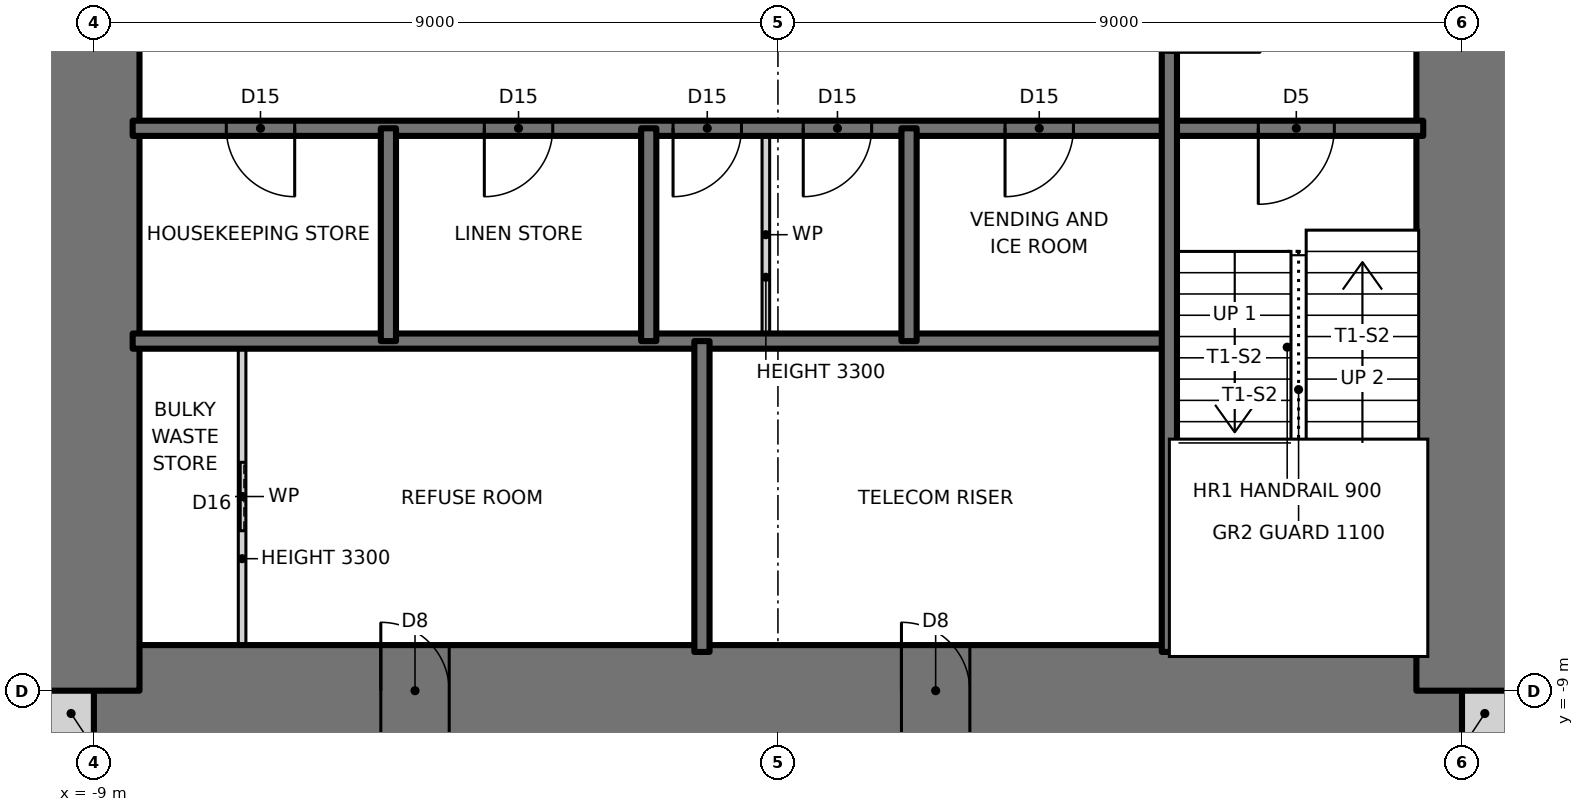
"""IFC4 building model, lengths in metres.
Left out: names, types, materials, properties, quantities, classifications, styles, units other than length and angle.
Written with IfcOpenShell. Run it as: python <this file> out.ifc"""

import sys

from ifc_helpers import new_model, si_unit, direction, frame, frame_2d, origin, place, context, subcontext, project, spatial, rectangle, extrude, element, fill, save


model = new_model("IFC4")
c1 = context("Model", 3, precision=1e-05, world=origin(), true_north=direction((0.0, 1.0)))
c2 = subcontext(c1, "Body", "Model", "MODEL_VIEW")
j1 = project(units=[si_unit("LENGTHUNIT", "METRE"), si_unit("PLANEANGLEUNIT", "RADIAN")], contexts=[c1])
p1 = place(None, origin())
s1 = spatial("IfcSite", under=j1, at=p1, CompositionType="ELEMENT")
p2 = place(p1, origin())
s2 = spatial("IfcBuilding", under=s1, at=p2, CompositionType="ELEMENT")
p3 = place(p2, frame((0.0, 0.0, 174.0)))
s3 = spatial("IfcBuildingStorey", under=s2, at=p3, CompositionType="ELEMENT", Elevation=174.0)
for number, where, z_axis, x_axis in (
    (1, (-9.6, -9.3, 0.0), (0.0, 0.0, 1.0), (1.0, 0.0, 0.0)),
    (2, (9.0, -9.3, 0.0), (0.0, 0.0, 1.0), (1.0, 0.0, 0.0)),
):
    element("IfcWall", number, at=place(p3, frame(where, z_axis=z_axis, x_axis=x_axis)), inside=s3, PredefinedType="SOLIDWALL", context=c2, shape_type="SweptSolid", body=[
        extrude(rectangle(XDim=0.6, YDim=0.6, at=frame_2d((0.3, 0.0))), origin(), (0.0, 0.0, 1.0), 3.5),
    ])
p4 = place(p3, frame((-9.0, -9.0, 0.0), z_axis=(0.0, 0.0, 1.0), x_axis=(1.0, 0.0, 0.0)))
e3 = element("IfcWall", 3, at=p4, inside=s3, PredefinedType="SHEAR", context=c2, shape_type="SweptSolid", body=[
    extrude(rectangle(XDim=18.0, YDim=1.2, at=frame_2d((9.0, 0.0))), origin(), (0.0, 0.0, 1.0), 3.5),
])
p5 = place(p4, frame((3.775, 0.0, 0.0)))
e4 = element("IfcOpeningElement", 4, at=p5, cuts=e3, PredefinedType="OPENING", context=c2, shape_type="SweptSolid", body=[
    extrude(rectangle(XDim=0.9, YDim=2.1, at=frame_2d((0.45, 1.05))), frame((0.0, 0.61, 0.0), z_axis=(0.0, -1.0, 0.0), x_axis=(1.0, 0.0, 0.0)), (0.0, 0.0, 1.0), 1.22),
])
p6 = place(p4, frame((10.625, 0.0, 0.0)))
e5 = element("IfcOpeningElement", 5, at=p6, cuts=e3, PredefinedType="OPENING", context=c2, shape_type="SweptSolid", body=[
    extrude(rectangle(XDim=0.9, YDim=2.1, at=frame_2d((0.45, 1.05))), frame((0.0, 0.61, 0.0), z_axis=(0.0, -1.0, 0.0), x_axis=(1.0, 0.0, 0.0)), (0.0, 0.0, 1.0), 1.22),
])
p7 = place(p3, frame((9.0, -9.0, 0.0), z_axis=(0.0, 0.0, 1.0), x_axis=(0.0, 1.0, 0.0)))
e6 = element("IfcWall", 6, at=p7, inside=s3, PredefinedType="SHEAR", context=c2, shape_type="SweptSolid", body=[
    extrude(rectangle(XDim=18.0, YDim=1.2, at=frame_2d((9.0, 0.0))), origin(), (0.0, 0.0, 1.0), 3.5),
])
p8 = place(p7, frame((8.5, 0.0, 0.0)))
e7 = element("IfcOpeningElement", 7, at=p8, cuts=e6, PredefinedType="OPENING", context=c2, shape_type="SweptSolid", body=[
    extrude(rectangle(XDim=1.0, YDim=2.1, at=frame_2d((0.5, 1.05))), frame((0.0, 0.61, 0.0), z_axis=(0.0, -1.0, 0.0), x_axis=(1.0, 0.0, 0.0)), (0.0, 0.0, 1.0), 1.22),
])
p9 = place(p3, frame((-9.0, 9.0, 0.0), z_axis=(0.0, 0.0, 1.0), x_axis=(0.0, -1.0, 0.0)))
e8 = element("IfcWall", 8, at=p9, inside=s3, PredefinedType="SHEAR", context=c2, shape_type="SweptSolid", body=[
    extrude(rectangle(XDim=18.0, YDim=1.2, at=frame_2d((9.0, 0.0))), origin(), (0.0, 0.0, 1.0), 3.5),
])
p10 = place(p9, frame((8.5, 0.0, 0.0)))
e9 = element("IfcOpeningElement", 9, at=p10, cuts=e8, PredefinedType="OPENING", context=c2, shape_type="SweptSolid", body=[
    extrude(rectangle(XDim=1.0, YDim=2.1, at=frame_2d((0.5, 1.05))), frame((0.0, 0.61, 0.0), z_axis=(0.0, -1.0, 0.0), x_axis=(1.0, 0.0, 0.0)), (0.0, 0.0, 1.0), 1.22),
])
p11 = place(p3, frame((-8.49, -4.4, 0.0), z_axis=(0.0, 0.0, 1.0), x_axis=(1.0, 0.0, 0.0)))
e10 = element("IfcWall", 10, at=p11, inside=s3, PredefinedType="SOLIDWALL", context=c2, shape_type="SweptSolid", body=[
    extrude(rectangle(XDim=13.64, YDim=0.2, at=frame_2d((6.82, 0.0))), origin(), (0.0, 0.0, 1.0), 3.5),
])
p12 = place(p3, frame((-8.49, -1.6, 0.0), z_axis=(0.0, 0.0, 1.0), x_axis=(1.0, 0.0, 0.0)))
e11 = element("IfcWall", 11, at=p12, inside=s3, PredefinedType="SOLIDWALL", context=c2, shape_type="SweptSolid", body=[
    extrude(rectangle(XDim=16.98, YDim=0.2, at=frame_2d((8.49, 0.0))), origin(), (0.0, 0.0, 1.0), 3.5),
])
p13 = place(p12, frame((14.81, 0.0, 0.0)))
e12 = element("IfcOpeningElement", 12, at=p13, cuts=e11, PredefinedType="OPENING", context=c2, shape_type="SweptSolid", body=[
    extrude(rectangle(XDim=1.0, YDim=2.1, at=frame_2d((0.5, 1.05))), frame((0.0, 0.11, 0.0), z_axis=(0.0, -1.0, 0.0), x_axis=(1.0, 0.0, 0.0)), (0.0, 0.0, 1.0), 0.22),
])
p14 = place(p12, frame((1.232, 0.0, 0.0)))
e13 = element("IfcOpeningElement", 13, at=p14, cuts=e11, PredefinedType="OPENING", context=c2, shape_type="SweptSolid", body=[
    extrude(rectangle(XDim=0.9, YDim=2.1, at=frame_2d((0.45, 1.05))), frame((0.0, 0.11, 0.0), z_axis=(0.0, -1.0, 0.0), x_axis=(1.0, 0.0, 0.0)), (0.0, 0.0, 1.0), 0.22),
])
p15 = place(p12, frame((4.627, 0.0, 0.0)))
e14 = element("IfcOpeningElement", 14, at=p15, cuts=e11, PredefinedType="OPENING", context=c2, shape_type="SweptSolid", body=[
    extrude(rectangle(XDim=0.9, YDim=2.1, at=frame_2d((0.45, 1.05))), frame((0.0, 0.11, 0.0), z_axis=(0.0, -1.0, 0.0), x_axis=(1.0, 0.0, 0.0)), (0.0, 0.0, 1.0), 0.22),
])
p16 = place(p12, frame((8.823, 0.0, 0.0)))
e15 = element("IfcOpeningElement", 15, at=p16, cuts=e11, PredefinedType="OPENING", context=c2, shape_type="SweptSolid", body=[
    extrude(rectangle(XDim=0.9, YDim=2.1, at=frame_2d((0.45, 1.05))), frame((0.0, 0.11, 0.0), z_axis=(0.0, -1.0, 0.0), x_axis=(1.0, 0.0, 0.0)), (0.0, 0.0, 1.0), 0.22),
])
p17 = place(p12, frame((7.11, 0.0, 0.0)))
e16 = element("IfcOpeningElement", 16, at=p17, cuts=e11, PredefinedType="OPENING", context=c2, shape_type="SweptSolid", body=[
    extrude(rectangle(XDim=0.9, YDim=2.1, at=frame_2d((0.45, 1.05))), frame((0.0, 0.11, 0.0), z_axis=(0.0, -1.0, 0.0), x_axis=(1.0, 0.0, 0.0)), (0.0, 0.0, 1.0), 0.22),
])
p18 = place(p12, frame((11.478, 0.0, 0.0)))
e17 = element("IfcOpeningElement", 17, at=p18, cuts=e11, PredefinedType="OPENING", context=c2, shape_type="SweptSolid", body=[
    extrude(rectangle(XDim=0.9, YDim=2.1, at=frame_2d((0.45, 1.05))), frame((0.0, 0.11, 0.0), z_axis=(0.0, -1.0, 0.0), x_axis=(1.0, 0.0, 0.0)), (0.0, 0.0, 1.0), 0.22),
])
p19 = place(p3, frame((5.15, -8.49, 0.0), z_axis=(0.0, 0.0, 1.0), x_axis=(0.0, 1.0, 0.0)))
e18 = element("IfcWall", 18, at=p19, inside=s3, PredefinedType="SOLIDWALL", context=c2, shape_type="SweptSolid", body=[
    extrude(rectangle(XDim=13.09, YDim=0.2, at=frame_2d((6.545, 0.0))), origin(), (0.0, 0.0, 1.0), 3.5),
])
p20 = place(p19, frame((7.89, 0.0, 0.0)))
e19 = element("IfcOpeningElement", 19, at=p20, cuts=e18, PredefinedType="OPENING", context=c2, shape_type="SweptSolid", body=[
    extrude(rectangle(XDim=1.2, YDim=2.1, at=frame_2d((0.6, 1.05))), frame((0.0, 0.11, 0.0), z_axis=(0.0, -1.0, 0.0), x_axis=(1.0, 0.0, 0.0)), (0.0, 0.0, 1.0), 0.22),
])
p21 = place(p3, frame((1.725, -4.4, 0.0), z_axis=(0.0, 0.0, 1.0), x_axis=(0.0, 1.0, 0.0)))
e20 = element("IfcWall", 20, at=p21, inside=s3, PredefinedType="SOLIDWALL", context=c2, shape_type="SweptSolid", body=[
    extrude(rectangle(XDim=2.8, YDim=0.2, at=frame_2d((1.4, 0.0))), origin(), (0.0, 0.0, 1.0), 3.5),
])
p22 = place(p3, frame((-0.159, -4.4, 0.0), z_axis=(0.0, 0.0, 1.0), x_axis=(0.0, 1.0, 0.0)))
e21 = element("IfcWall", 21, at=p22, inside=s3, PredefinedType="PARTITIONING", context=c2, shape_type="SweptSolid", body=[
    extrude(rectangle(XDim=2.8, YDim=0.1, at=frame_2d((1.4, 0.0))), origin(), (0.0, 0.0, 1.0), 3.3),
])
p23 = place(p3, frame((-1.0, -8.49, 0.0), z_axis=(0.0, 0.0, 1.0), x_axis=(0.0, 1.0, 0.0)))
e22 = element("IfcWall", 22, at=p23, inside=s3, PredefinedType="SOLIDWALL", context=c2, shape_type="SweptSolid", body=[
    extrude(rectangle(XDim=4.09, YDim=0.2, at=frame_2d((2.045, 0.0))), origin(), (0.0, 0.0, 1.0), 3.5),
])
for number, where, z_axis, x_axis in (
    (23, (-1.7, -4.4, 0.0), (0.0, 0.0, 1.0), (0.0, 1.0, 0.0)),
    (24, (-5.125, -4.4, 0.0), (0.0, 0.0, 1.0), (0.0, 1.0, 0.0)),
):
    element("IfcWall", number, at=place(p3, frame(where, z_axis=z_axis, x_axis=x_axis)), inside=s3, PredefinedType="SOLIDWALL", context=c2, shape_type="SweptSolid", body=[
        extrude(rectangle(XDim=2.8, YDim=0.2, at=frame_2d((1.4, 0.0))), origin(), (0.0, 0.0, 1.0), 3.5),
    ])
p24 = place(p3, frame((-7.05, -8.49, 0.0), z_axis=(0.0, 0.0, 1.0), x_axis=(0.0, 1.0, 0.0)))
e25 = element("IfcWall", 25, at=p24, inside=s3, PredefinedType="PARTITIONING", context=c2, shape_type="SweptSolid", body=[
    extrude(rectangle(XDim=4.09, YDim=0.1, at=frame_2d((2.045, 0.0))), origin(), (0.0, 0.0, 1.0), 3.3),
])
p25 = place(p24, frame((1.595, 0.0, 0.0)))
e26 = element("IfcOpeningElement", 26, at=p25, cuts=e25, PredefinedType="OPENING", context=c2, shape_type="SweptSolid", body=[
    extrude(rectangle(XDim=0.9, YDim=2.1, at=frame_2d((0.45, 1.05))), frame((0.0, 0.06, 0.0), z_axis=(0.0, -1.0, 0.0), x_axis=(1.0, 0.0, 0.0)), (0.0, 0.0, 1.0), 0.12),
])
p26 = place(p13, frame((1.0, 0.0, 0.0), z_axis=(0.0, 0.0, 1.0), x_axis=(-1.0, 0.0, 0.0)))
e27 = element("IfcDoor", 27, at=p26, inside=s3, OperationType="SINGLE_SWING_RIGHT", PredefinedType="DOOR", context=c2, shape_type="SweptSolid", body=[
    extrude(rectangle(XDim=1.0, YDim=2.1, at=frame_2d((0.5, 1.05))), frame((0.0, 0.025, 0.0), z_axis=(0.0, -1.0, 0.0), x_axis=(1.0, 0.0, 0.0)), (0.0, 0.0, 1.0), 0.05),
])
fill(e12, e27)
p27 = place(p20, frame((1.2, 0.0, 0.0), z_axis=(0.0, 0.0, 1.0), x_axis=(-1.0, 0.0, 0.0)))
e28 = element("IfcDoor", 28, at=p27, inside=s3, OperationType="SINGLE_SWING_RIGHT", PredefinedType="DOOR", context=c2, shape_type="SweptSolid", body=[
    extrude(rectangle(XDim=1.2, YDim=2.1, at=frame_2d((0.6, 1.05))), frame((0.0, 0.025, 0.0), z_axis=(0.0, -1.0, 0.0), x_axis=(1.0, 0.0, 0.0)), (0.0, 0.0, 1.0), 0.05),
])
fill(e19, e28)
p28 = place(p14, frame((0.9, 0.0, 0.0), z_axis=(0.0, 0.0, 1.0), x_axis=(-1.0, 0.0, 0.0)))
e29 = element("IfcDoor", 29, at=p28, inside=s3, OperationType="SINGLE_SWING_LEFT", PredefinedType="DOOR", context=c2, shape_type="SweptSolid", body=[
    extrude(rectangle(XDim=0.9, YDim=2.1, at=frame_2d((0.45, 1.05))), frame((0.0, 0.025, 0.0), z_axis=(0.0, -1.0, 0.0), x_axis=(1.0, 0.0, 0.0)), (0.0, 0.0, 1.0), 0.05),
])
fill(e13, e29)
p29 = place(p15, frame((0.9, 0.0, 0.0), z_axis=(0.0, 0.0, 1.0), x_axis=(-1.0, 0.0, 0.0)))
e30 = element("IfcDoor", 30, at=p29, inside=s3, OperationType="SINGLE_SWING_RIGHT", PredefinedType="DOOR", context=c2, shape_type="SweptSolid", body=[
    extrude(rectangle(XDim=0.9, YDim=2.1, at=frame_2d((0.45, 1.05))), frame((0.0, 0.025, 0.0), z_axis=(0.0, -1.0, 0.0), x_axis=(1.0, 0.0, 0.0)), (0.0, 0.0, 1.0), 0.05),
])
fill(e14, e30)
p30 = place(p16, frame((0.9, 0.0, 0.0), z_axis=(0.0, 0.0, 1.0), x_axis=(-1.0, 0.0, 0.0)))
e31 = element("IfcDoor", 31, at=p30, inside=s3, OperationType="SINGLE_SWING_RIGHT", PredefinedType="DOOR", context=c2, shape_type="SweptSolid", body=[
    extrude(rectangle(XDim=0.9, YDim=2.1, at=frame_2d((0.45, 1.05))), frame((0.0, 0.025, 0.0), z_axis=(0.0, -1.0, 0.0), x_axis=(1.0, 0.0, 0.0)), (0.0, 0.0, 1.0), 0.05),
])
fill(e15, e31)
p31 = place(p17, frame((0.9, 0.0, 0.0), z_axis=(0.0, 0.0, 1.0), x_axis=(-1.0, 0.0, 0.0)))
e32 = element("IfcDoor", 32, at=p31, inside=s3, OperationType="SINGLE_SWING_RIGHT", PredefinedType="DOOR", context=c2, shape_type="SweptSolid", body=[
    extrude(rectangle(XDim=0.9, YDim=2.1, at=frame_2d((0.45, 1.05))), frame((0.0, 0.025, 0.0), z_axis=(0.0, -1.0, 0.0), x_axis=(1.0, 0.0, 0.0)), (0.0, 0.0, 1.0), 0.05),
])
fill(e16, e32)
p32 = place(p18, frame((0.9, 0.0, 0.0), z_axis=(0.0, 0.0, 1.0), x_axis=(-1.0, 0.0, 0.0)))
e33 = element("IfcDoor", 33, at=p32, inside=s3, OperationType="SINGLE_SWING_RIGHT", PredefinedType="DOOR", context=c2, shape_type="SweptSolid", body=[
    extrude(rectangle(XDim=0.9, YDim=2.1, at=frame_2d((0.45, 1.05))), frame((0.0, 0.025, 0.0), z_axis=(0.0, -1.0, 0.0), x_axis=(1.0, 0.0, 0.0)), (0.0, 0.0, 1.0), 0.05),
])
fill(e17, e33)
p33 = place(p25, origin())
e34 = element("IfcDoor", 34, at=p33, inside=s3, OperationType="SLIDING_TO_LEFT", PredefinedType="DOOR", context=c2, shape_type="SweptSolid", body=[
    extrude(rectangle(XDim=0.9, YDim=2.1, at=frame_2d((0.45, 1.05))), frame((0.0, 0.025, 0.0), z_axis=(0.0, -1.0, 0.0), x_axis=(1.0, 0.0, 0.0)), (0.0, 0.0, 1.0), 0.05),
])
fill(e26, e34)
p34 = place(p5, origin())
e35 = element("IfcDoor", 35, at=p34, inside=s3, OperationType="SINGLE_SWING_LEFT", PredefinedType="DOOR", context=c2, shape_type="SweptSolid", body=[
    extrude(rectangle(XDim=0.9, YDim=2.1, at=frame_2d((0.45, 1.05))), frame((0.0, 0.025, 0.0), z_axis=(0.0, -1.0, 0.0), x_axis=(1.0, 0.0, 0.0)), (0.0, 0.0, 1.0), 0.05),
])
fill(e4, e35)
p35 = place(p6, origin())
e36 = element("IfcDoor", 36, at=p35, inside=s3, OperationType="SINGLE_SWING_LEFT", PredefinedType="DOOR", context=c2, shape_type="SweptSolid", body=[
    extrude(rectangle(XDim=0.9, YDim=2.1, at=frame_2d((0.45, 1.05))), frame((0.0, 0.025, 0.0), z_axis=(0.0, -1.0, 0.0), x_axis=(1.0, 0.0, 0.0)), (0.0, 0.0, 1.0), 0.05),
])
fill(e5, e36)
save(model, sys.argv[1])
